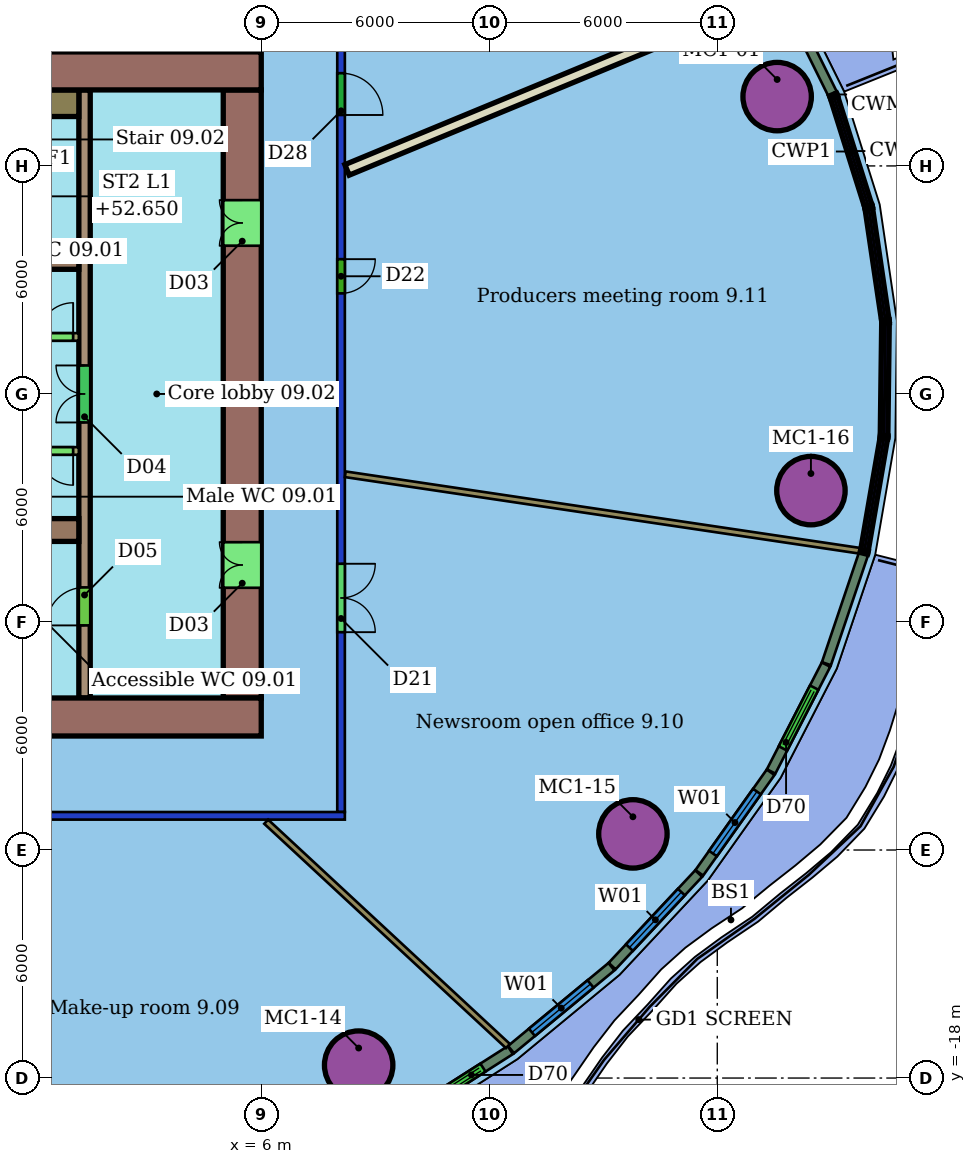
"""IFC4 building model, lengths in metres.
Left out: names, types, materials, properties, quantities, classifications, styles, units other than length and angle.
Written with IfcOpenShell. Run it as: python <this file> out.ifc"""

import sys

from ifc_helpers import new_model, si_unit, direction, frame, frame_2d, origin, origin_2d, place, context, subcontext, project, spatial, rectangle, hollow_circle, extrude, element, fill, save


model = new_model("IFC4")
c1 = context("Model", 3, precision=1e-05, world=origin(), true_north=direction((0.0, 1.0)))
c2 = subcontext(c1, "Body", "Model", "MODEL_VIEW")
j1 = project(units=[si_unit("LENGTHUNIT", "METRE"), si_unit("PLANEANGLEUNIT", "RADIAN")], contexts=[c1])
p1 = place(None, origin())
s1 = spatial("IfcSite", under=j1, at=p1, CompositionType="ELEMENT")
p2 = place(p1, origin())
s2 = spatial("IfcBuilding", under=s1, at=p2, CompositionType="ELEMENT")
p3 = place(p2, frame((0.0, 0.0, 50.8)))
s3 = spatial("IfcBuildingStorey", under=s2, at=p3, CompositionType="ELEMENT", Elevation=50.8)
for number, where, z_axis, x_axis in (
    (1, (19.575, 7.824, 0.0), (0.0, 0.0, 1.0), (1.0, 0.0, 0.0)),
    (2, (8.563, -17.66, 0.0), (0.0, 0.0, 1.0), (1.0, 0.0, 0.0)),
    (3, (15.78, -11.576, 0.0), (0.0, 0.0, 1.0), (1.0, 0.0, 0.0)),
    (4, (20.464, -2.543, 0.0), (0.0, 0.0, 1.0), (1.0, 0.0, 0.0)),
):
    element("IfcColumn", number, at=place(p3, frame(where, z_axis=z_axis, x_axis=x_axis)), inside=s3, PredefinedType="COLUMN", context=c2, shape_type="SweptSolid", body=[
        extrude(hollow_circle(Radius=0.9, WallThickness=0.06, at=origin_2d()), origin(), (0.0, 0.0, 1.0), 3.55),
    ])
p4 = place(p3, frame((8.2, -11.1, 0.0), z_axis=(0.0, 0.0, 1.0), x_axis=(-1.0, 0.0, 0.0)))
e5 = element("IfcWall", 5, at=p4, inside=s3, PredefinedType="PARTITIONING", context=c2, shape_type="SweptSolid", body=[
    extrude(rectangle(XDim=28.4, YDim=0.2, at=frame_2d((14.2, 0.0))), origin(), (0.0, 0.0, 1.0), 2.85),
])
p5 = place(p4, frame((24.814, 0.0, 0.0)))
e6 = element("IfcOpeningElement", 6, at=p5, cuts=e5, PredefinedType="OPENING", context=c2, shape_type="SweptSolid", body=[
    extrude(rectangle(XDim=1.0, YDim=2.1, at=frame_2d((0.5, 1.05))), frame((0.0, 0.11, 0.0), z_axis=(0.0, -1.0, 0.0), x_axis=(1.0, 0.0, 0.0)), (0.0, 0.0, 1.0), 0.22),
])
p6 = place(p4, frame((18.447, 0.0, 0.0)))
e7 = element("IfcOpeningElement", 7, at=p6, cuts=e5, PredefinedType="OPENING", context=c2, shape_type="SweptSolid", body=[
    extrude(rectangle(XDim=1.8, YDim=2.1, at=frame_2d((0.9, 1.05))), frame((0.0, 0.11, 0.0), z_axis=(0.0, -1.0, 0.0), x_axis=(1.0, 0.0, 0.0)), (0.0, 0.0, 1.0), 0.22),
])
p7 = place(p4, frame((7.966, 0.0, 0.0)))
e8 = element("IfcOpeningElement", 8, at=p7, cuts=e5, PredefinedType="OPENING", context=c2, shape_type="SweptSolid", body=[
    extrude(rectangle(XDim=0.9, YDim=2.1, at=frame_2d((0.45, 1.05))), frame((0.0, 0.11, 0.0), z_axis=(0.0, -1.0, 0.0), x_axis=(1.0, 0.0, 0.0)), (0.0, 0.0, 1.0), 0.22),
])
p8 = place(p3, frame((8.1, 11.0, 0.0), z_axis=(0.0, 0.0, 1.0), x_axis=(0.0, -1.0, 0.0)))
e9 = element("IfcWall", 9, at=p8, inside=s3, PredefinedType="PARTITIONING", context=c2, shape_type="SweptSolid", body=[
    extrude(rectangle(XDim=22.0, YDim=0.2, at=frame_2d((11.0, 0.0))), origin(), (0.0, 0.0, 1.0), 2.85),
])
p9 = place(p8, frame((2.56, 0.0, 0.0)))
e10 = element("IfcOpeningElement", 10, at=p9, cuts=e9, PredefinedType="OPENING", context=c2, shape_type="SweptSolid", body=[
    extrude(rectangle(XDim=1.1, YDim=2.1, at=frame_2d((0.55, 1.05))), frame((0.0, 0.11, 0.0), z_axis=(0.0, -1.0, 0.0), x_axis=(1.0, 0.0, 0.0)), (0.0, 0.0, 1.0), 0.22),
])
p10 = place(p8, frame((15.468, 0.0, 0.0)))
e11 = element("IfcOpeningElement", 11, at=p10, cuts=e9, PredefinedType="OPENING", context=c2, shape_type="SweptSolid", body=[
    extrude(rectangle(XDim=1.8, YDim=2.1, at=frame_2d((0.9, 1.05))), frame((0.0, 0.11, 0.0), z_axis=(0.0, -1.0, 0.0), x_axis=(1.0, 0.0, 0.0)), (0.0, 0.0, 1.0), 0.22),
])
p11 = place(p8, frame((7.453, 0.0, 0.0)))
e12 = element("IfcOpeningElement", 12, at=p11, cuts=e9, PredefinedType="OPENING", context=c2, shape_type="SweptSolid", body=[
    extrude(rectangle(XDim=0.9, YDim=2.1, at=frame_2d((0.45, 1.05))), frame((0.0, 0.11, 0.0), z_axis=(0.0, -1.0, 0.0), x_axis=(1.0, 0.0, 0.0)), (0.0, 0.0, 1.0), 0.22),
])
p12 = place(p3, frame((19.569, 10.573, 0.0), z_axis=(0.0, 0.0, 1.0), x_axis=(-0.924113266053, -0.382118661551, 0.0)))
e13 = element("IfcWall", 13, at=p12, inside=s3, PredefinedType="PARTITIONING", context=c2, shape_type="SweptSolid", body=[
    extrude(rectangle(XDim=12.241, YDim=0.3, at=frame_2d((6.121, 0.0))), origin(), (0.0, 0.0, 1.0), 3.55),
])
p13 = place(p3, frame((12.491, -17.157, 0.0), z_axis=(0.0, 0.0, 1.0), x_axis=(-0.733043944871, 0.680181280901, 0.0)))
e14 = element("IfcWall", 14, at=p13, inside=s3, PredefinedType="PARTITIONING", context=c2, shape_type="SweptSolid", body=[
    extrude(rectangle(XDim=8.678, YDim=0.15, at=frame_2d((4.339, 0.0))), origin(), (0.0, 0.0, 1.0), 3.55),
])
p14 = place(p3, frame((21.744, -4.125, 0.0), z_axis=(0.0, 0.0, 1.0), x_axis=(-0.989126490961, 0.147067280113, 0.0)))
e15 = element("IfcWall", 15, at=p14, inside=s3, PredefinedType="PARTITIONING", context=c2, shape_type="SweptSolid", body=[
    extrude(rectangle(XDim=13.682, YDim=0.15, at=frame_2d((6.841, 0.0))), origin(), (0.0, 0.0, 1.0), 3.55),
])
p15 = place(p3, frame((21.036, 7.892, 0.0), z_axis=(0.0, 0.0, 1.0), x_axis=(-0.443751201737, 0.896150027036, 0.0)))
e16 = element("IfcWall", 16, at=p15, inside=s3, PredefinedType="SOLIDWALL", context=c2, shape_type="SweptSolid", body=[
    extrude(rectangle(XDim=3.049, YDim=0.25, at=frame_2d((1.524, 0.0))), origin(), (0.0, 0.0, 1.0), 3.15),
])
p16 = place(p3, frame((9.595, -19.154, 0.0), z_axis=(0.0, 0.0, 1.0), x_axis=(0.843008079685, 0.53790089941, 0.0)))
e17 = element("IfcWall", 17, at=p16, inside=s3, PredefinedType="SOLIDWALL", context=c2, shape_type="SweptSolid", body=[
    extrude(rectangle(XDim=3.511, YDim=0.25, at=frame_2d((1.756, 0.0))), origin(), (0.0, 0.0, 1.0), 3.15),
])
p17 = place(p16, frame((0.856, 0.0, 0.0)))
e18 = element("IfcOpeningElement", 18, at=p17, cuts=e17, PredefinedType="OPENING", context=c2, shape_type="SweptSolid", body=[
    extrude(rectangle(XDim=1.8, YDim=2.4, at=frame_2d((0.9, 1.2))), frame((0.0, 0.135, 0.0), z_axis=(0.0, -1.0, 0.0), x_axis=(1.0, 0.0, 0.0)), (0.0, 0.0, 1.0), 0.27),
])
p18 = place(p3, frame((12.573, -17.251, 0.0), z_axis=(0.0, 0.0, 1.0), x_axis=(0.771145821292, 0.636658560222, 0.0)))
e19 = element("IfcWall", 19, at=p18, inside=s3, PredefinedType="SOLIDWALL", context=c2, shape_type="SweptSolid", body=[
    extrude(rectangle(XDim=3.426, YDim=0.25, at=frame_2d((1.713, 0.0))), origin(), (0.0, 0.0, 1.0), 3.15),
])
p19 = place(p18, frame((0.713, 0.0, 0.8)))
e20 = element("IfcOpeningElement", 20, at=p19, cuts=e19, PredefinedType="OPENING", context=c2, shape_type="SweptSolid", body=[
    extrude(rectangle(XDim=2.0, YDim=2.2, at=frame_2d((1.0, 1.1))), frame((0.0, 0.135, 0.0), z_axis=(0.0, -1.0, 0.0), x_axis=(1.0, 0.0, 0.0)), (0.0, 0.0, 1.0), 0.27),
])
p20 = place(p3, frame((15.233, -15.054, 0.0), z_axis=(0.0, 0.0, 1.0), x_axis=(0.683288117208, 0.730148853921, 0.0)))
e21 = element("IfcWall", 21, at=p20, inside=s3, PredefinedType="SOLIDWALL", context=c2, shape_type="SweptSolid", body=[
    extrude(rectangle(XDim=3.334, YDim=0.25, at=frame_2d((1.667, 0.0))), origin(), (0.0, 0.0, 1.0), 3.15),
])
p21 = place(p20, frame((0.667, 0.0, 0.8)))
e22 = element("IfcOpeningElement", 22, at=p21, cuts=e21, PredefinedType="OPENING", context=c2, shape_type="SweptSolid", body=[
    extrude(rectangle(XDim=2.0, YDim=2.2, at=frame_2d((1.0, 1.1))), frame((0.0, 0.135, 0.0), z_axis=(0.0, -1.0, 0.0), x_axis=(1.0, 0.0, 0.0)), (0.0, 0.0, 1.0), 0.27),
])
p22 = place(p3, frame((17.527, -12.6, 0.0), z_axis=(0.0, 0.0, 1.0), x_axis=(0.578643660536, 0.81558047679, 0.0)))
e23 = element("IfcWall", 23, at=p22, inside=s3, PredefinedType="SOLIDWALL", context=c2, shape_type="SweptSolid", body=[
    extrude(rectangle(XDim=3.244, YDim=0.25, at=frame_2d((1.622, 0.0))), origin(), (0.0, 0.0, 1.0), 3.15),
])
p23 = place(p22, frame((0.622, 0.0, 0.8)))
e24 = element("IfcOpeningElement", 24, at=p23, cuts=e23, PredefinedType="OPENING", context=c2, shape_type="SweptSolid", body=[
    extrude(rectangle(XDim=2.0, YDim=2.2, at=frame_2d((1.0, 1.1))), frame((0.0, 0.135, 0.0), z_axis=(0.0, -1.0, 0.0), x_axis=(1.0, 0.0, 0.0)), (0.0, 0.0, 1.0), 0.27),
])
p24 = place(p3, frame((19.417, -9.932, 0.0), z_axis=(0.0, 0.0, 1.0), x_axis=(0.457105364661, 0.889412550844, 0.0)))
e25 = element("IfcWall", 25, at=p24, inside=s3, PredefinedType="SOLIDWALL", context=c2, shape_type="SweptSolid", body=[
    extrude(rectangle(XDim=3.16, YDim=0.25, at=frame_2d((1.58, 0.0))), origin(), (0.0, 0.0, 1.0), 3.15),
])
p25 = place(p24, frame((0.68, 0.0, 0.0)))
e26 = element("IfcOpeningElement", 26, at=p25, cuts=e25, PredefinedType="OPENING", context=c2, shape_type="SweptSolid", body=[
    extrude(rectangle(XDim=1.8, YDim=2.4, at=frame_2d((0.9, 1.2))), frame((0.0, 0.135, 0.0), z_axis=(0.0, -1.0, 0.0), x_axis=(1.0, 0.0, 0.0)), (0.0, 0.0, 1.0), 0.27),
])
p26 = place(p3, frame((20.872, -7.097, 0.0), z_axis=(0.0, 0.0, 1.0), x_axis=(0.319948454673, 0.947434950987, 0.0)))
e27 = element("IfcWall", 27, at=p26, inside=s3, PredefinedType="SOLIDWALL", context=c2, shape_type="SweptSolid", body=[
    extrude(rectangle(XDim=3.049, YDim=0.25, at=frame_2d((1.525, 0.0))), origin(), (0.0, 0.0, 1.0), 3.15),
])
p27 = place(p3, frame((6.0, 8.5, 0.0), z_axis=(0.0, 0.0, 1.0), x_axis=(-1.0, 0.0, 0.0)))
e28 = element("IfcWall", 28, at=p27, inside=s3, PredefinedType="SHEAR", context=c2, shape_type="SweptSolid", body=[
    extrude(rectangle(XDim=12.0, YDim=1.0, at=frame_2d((6.0, 0.0))), origin(), (0.0, 0.0, 1.0), 3.4),
])
p28 = place(p27, frame((5.6, 0.0, 0.0)))
e29 = element("IfcOpeningElement", 29, at=p28, cuts=e28, PredefinedType="OPENING", context=c2, shape_type="SweptSolid", body=[
    extrude(rectangle(XDim=1.2, YDim=2.1, at=frame_2d((0.6, 1.05))), frame((0.0, 0.51, 0.0), z_axis=(0.0, -1.0, 0.0), x_axis=(1.0, 0.0, 0.0)), (0.0, 0.0, 1.0), 1.02),
])
p29 = place(p3, frame((-18.0, -8.5, 0.0), z_axis=(0.0, 0.0, 1.0), x_axis=(1.0, 0.0, 0.0)))
e30 = element("IfcWall", 30, at=p29, inside=s3, PredefinedType="SHEAR", context=c2, shape_type="SweptSolid", body=[
    extrude(rectangle(XDim=24.0, YDim=1.0, at=frame_2d((12.0, 0.0))), origin(), (0.0, 0.0, 1.0), 3.4),
])
p30 = place(p29, frame((6.0, 0.0, 0.0)))
e31 = element("IfcOpeningElement", 31, at=p30, cuts=e30, PredefinedType="OPENING", context=c2, shape_type="SweptSolid", body=[
    extrude(rectangle(XDim=1.2, YDim=2.1, at=frame_2d((0.6, 1.05))), frame((0.0, 0.51, 0.0), z_axis=(0.0, -1.0, 0.0), x_axis=(1.0, 0.0, 0.0)), (0.0, 0.0, 1.0), 1.02),
])
p31 = place(p3, frame((5.5, -8.0, 0.0), z_axis=(0.0, 0.0, 1.0), x_axis=(0.0, 1.0, 0.0)))
e32 = element("IfcWall", 32, at=p31, inside=s3, PredefinedType="SHEAR", context=c2, shape_type="SweptSolid", body=[
    extrude(rectangle(XDim=16.0, YDim=1.0, at=frame_2d((8.0, 0.0))), origin(), (0.0, 0.0, 1.0), 3.4),
])
p32 = place(p31, frame((2.9, 0.0, 0.0)))
e33 = element("IfcOpeningElement", 33, at=p32, cuts=e32, PredefinedType="OPENING", context=c2, shape_type="SweptSolid", body=[
    extrude(rectangle(XDim=1.2, YDim=2.1, at=frame_2d((0.6, 1.05))), frame((0.0, 0.51, 0.0), z_axis=(0.0, -1.0, 0.0), x_axis=(1.0, 0.0, 0.0)), (0.0, 0.0, 1.0), 1.02),
])
p33 = place(p31, frame((11.9, 0.0, 0.0)))
e34 = element("IfcOpeningElement", 34, at=p33, cuts=e32, PredefinedType="OPENING", context=c2, shape_type="SweptSolid", body=[
    extrude(rectangle(XDim=1.2, YDim=2.1, at=frame_2d((0.6, 1.05))), frame((0.0, 0.51, 0.0), z_axis=(0.0, -1.0, 0.0), x_axis=(1.0, 0.0, 0.0)), (0.0, 0.0, 1.0), 1.02),
])
for number, where, z_axis, x_axis in (
    (35, (-6.0, 3.58, 0.0), (0.0, 0.0, 1.0), (1.0, 0.0, 0.0)),
    (36, (-6.0, -3.58, 0.0), (0.0, 0.0, 1.0), (1.0, 0.0, 0.0)),
):
    element("IfcWall", number, at=place(p3, frame(where, z_axis=z_axis, x_axis=x_axis)), inside=s3, PredefinedType="SHEAR", context=c2, shape_type="SweptSolid", body=[
        extrude(rectangle(XDim=7.2, YDim=0.6, at=frame_2d((3.6, 0.0))), origin(), (0.0, 0.0, 1.0), 3.4),
    ])
p34 = place(p3, frame((1.35, -8.0, 0.0), z_axis=(0.0, 0.0, 1.0), x_axis=(0.0, 1.0, 0.0)))
e37 = element("IfcWall", 37, at=p34, inside=s3, PredefinedType="SHEAR", context=c2, shape_type="SweptSolid", body=[
    extrude(rectangle(XDim=16.0, YDim=0.3, at=frame_2d((8.0, 0.0))), origin(), (0.0, 0.0, 1.0), 3.4),
])
p35 = place(p34, frame((1.91, 0.0, 0.0)))
e38 = element("IfcOpeningElement", 38, at=p35, cuts=e37, PredefinedType="OPENING", context=c2, shape_type="SweptSolid", body=[
    extrude(rectangle(XDim=1.0, YDim=2.1, at=frame_2d((0.5, 1.05))), frame((0.0, 0.16, 0.0), z_axis=(0.0, -1.0, 0.0), x_axis=(1.0, 0.0, 0.0)), (0.0, 0.0, 1.0), 0.32),
])
p36 = place(p34, frame((7.25, 0.0, 0.0)))
e39 = element("IfcOpeningElement", 39, at=p36, cuts=e37, PredefinedType="OPENING", context=c2, shape_type="SweptSolid", body=[
    extrude(rectangle(XDim=1.5, YDim=2.1, at=frame_2d((0.75, 1.05))), frame((0.0, 0.16, 0.0), z_axis=(0.0, -1.0, 0.0), x_axis=(1.0, 0.0, 0.0)), (0.0, 0.0, 1.0), 0.32),
])
p37 = place(p3, frame((-13.2, 1.5, 0.0), z_axis=(0.0, 0.0, 1.0), x_axis=(1.0, 0.0, 0.0)))
e40 = element("IfcWall", 40, at=p37, inside=s3, PredefinedType="SHEAR", context=c2, shape_type="SweptSolid", body=[
    extrude(rectangle(XDim=14.4, YDim=0.2, at=frame_2d((7.2, 0.0))), origin(), (0.0, 0.0, 1.0), 3.4),
])
p38 = place(p37, frame((0.546, 0.0, 0.0)))
e41 = element("IfcOpeningElement", 41, at=p38, cuts=e40, PredefinedType="OPENING", context=c2, shape_type="SweptSolid", body=[
    extrude(rectangle(XDim=1.1, YDim=2.1, at=frame_2d((0.55, 1.05))), frame((0.0, 0.11, 0.0), z_axis=(0.0, -1.0, 0.0), x_axis=(1.0, 0.0, 0.0)), (0.0, 0.0, 1.0), 0.22),
])
p39 = place(p37, frame((2.988, 0.0, 0.0)))
e42 = element("IfcOpeningElement", 42, at=p39, cuts=e40, PredefinedType="OPENING", context=c2, shape_type="SweptSolid", body=[
    extrude(rectangle(XDim=1.1, YDim=2.1, at=frame_2d((0.55, 1.05))), frame((0.0, 0.11, 0.0), z_axis=(0.0, -1.0, 0.0), x_axis=(1.0, 0.0, 0.0)), (0.0, 0.0, 1.0), 0.22),
])
p40 = place(p37, frame((5.429, 0.0, 0.0)))
e43 = element("IfcOpeningElement", 43, at=p40, cuts=e40, PredefinedType="OPENING", context=c2, shape_type="SweptSolid", body=[
    extrude(rectangle(XDim=1.1, YDim=2.1, at=frame_2d((0.55, 1.05))), frame((0.0, 0.11, 0.0), z_axis=(0.0, -1.0, 0.0), x_axis=(1.0, 0.0, 0.0)), (0.0, 0.0, 1.0), 0.22),
])
p41 = place(p37, frame((7.871, 0.0, 0.0)))
e44 = element("IfcOpeningElement", 44, at=p41, cuts=e40, PredefinedType="OPENING", context=c2, shape_type="SweptSolid", body=[
    extrude(rectangle(XDim=1.1, YDim=2.1, at=frame_2d((0.55, 1.05))), frame((0.0, 0.11, 0.0), z_axis=(0.0, -1.0, 0.0), x_axis=(1.0, 0.0, 0.0)), (0.0, 0.0, 1.0), 0.22),
])
p42 = place(p37, frame((13.35, 0.0, 0.0)))
e45 = element("IfcOpeningElement", 45, at=p42, cuts=e40, PredefinedType="OPENING", context=c2, shape_type="SweptSolid", body=[
    extrude(rectangle(XDim=0.9, YDim=2.1, at=frame_2d((0.45, 1.05))), frame((0.0, 0.11, 0.0), z_axis=(0.0, -1.0, 0.0), x_axis=(1.0, 0.0, 0.0)), (0.0, 0.0, 1.0), 0.22),
])
p43 = place(p3, frame((1.2, -1.5, 0.0), z_axis=(0.0, 0.0, 1.0), x_axis=(-1.0, 0.0, 0.0)))
e46 = element("IfcWall", 46, at=p43, inside=s3, PredefinedType="SHEAR", context=c2, shape_type="SweptSolid", body=[
    extrude(rectangle(XDim=14.4, YDim=0.2, at=frame_2d((7.2, 0.0))), origin(), (0.0, 0.0, 1.0), 3.4),
])
p44 = place(p43, frame((7.821, 0.0, 0.0)))
e47 = element("IfcOpeningElement", 47, at=p44, cuts=e46, PredefinedType="OPENING", context=c2, shape_type="SweptSolid", body=[
    extrude(rectangle(XDim=1.2, YDim=2.1, at=frame_2d((0.6, 1.05))), frame((0.0, 0.11, 0.0), z_axis=(0.0, -1.0, 0.0), x_axis=(1.0, 0.0, 0.0)), (0.0, 0.0, 1.0), 0.22),
])
p45 = place(p43, frame((0.15, 0.0, 0.0)))
e48 = element("IfcOpeningElement", 48, at=p45, cuts=e46, PredefinedType="OPENING", context=c2, shape_type="SweptSolid", body=[
    extrude(rectangle(XDim=0.9, YDim=2.1, at=frame_2d((0.45, 1.05))), frame((0.0, 0.11, 0.0), z_axis=(0.0, -1.0, 0.0), x_axis=(1.0, 0.0, 0.0)), (0.0, 0.0, 1.0), 0.22),
])
p46 = place(p3, frame((0.4, 7.65, 0.0), z_axis=(0.0, 0.0, 1.0), x_axis=(1.0, 0.0, 0.0)))
e49 = element("IfcWall", 49, at=p46, inside=s3, PredefinedType="SHEAR", context=c2, shape_type="SweptSolid", body=[
    extrude(rectangle(XDim=0.8, YDim=0.7, at=frame_2d((0.4, 0.0))), origin(), (0.0, 0.0, 1.0), 3.4),
])
p47 = place(p9, origin())
e50 = element("IfcDoor", 50, at=p47, inside=s3, OperationType="SINGLE_SWING_RIGHT", PredefinedType="DOOR", context=c2, shape_type="SweptSolid", body=[
    extrude(rectangle(XDim=1.1, YDim=2.1, at=frame_2d((0.55, 1.05))), frame((0.0, 0.025, 0.0), z_axis=(0.0, -1.0, 0.0), x_axis=(1.0, 0.0, 0.0)), (0.0, 0.0, 1.0), 0.05),
])
fill(e10, e50)
p48 = place(p10, origin())
e51 = element("IfcDoor", 51, at=p48, inside=s3, OperationType="DOUBLE_DOOR_SINGLE_SWING", PredefinedType="DOOR", context=c2, shape_type="SweptSolid", body=[
    extrude(rectangle(XDim=1.8, YDim=2.1, at=frame_2d((0.9, 1.05))), frame((0.0, 0.025, 0.0), z_axis=(0.0, -1.0, 0.0), x_axis=(1.0, 0.0, 0.0)), (0.0, 0.0, 1.0), 0.05),
])
fill(e11, e51)
p49 = place(p11, origin())
e52 = element("IfcDoor", 52, at=p49, inside=s3, OperationType="SINGLE_SWING_LEFT", PredefinedType="DOOR", context=c2, shape_type="SweptSolid", body=[
    extrude(rectangle(XDim=0.9, YDim=2.1, at=frame_2d((0.45, 1.05))), frame((0.0, 0.025, 0.0), z_axis=(0.0, -1.0, 0.0), x_axis=(1.0, 0.0, 0.0)), (0.0, 0.0, 1.0), 0.05),
])
fill(e12, e52)
p50 = place(p17, origin())
e53 = element("IfcDoor", 53, at=p50, inside=s3, OperationType="DOUBLE_DOOR_SLIDING", PredefinedType="DOOR", context=c2, shape_type="SweptSolid", body=[
    extrude(rectangle(XDim=1.8, YDim=2.4, at=frame_2d((0.9, 1.2))), frame((0.0, 0.025, 0.0), z_axis=(0.0, -1.0, 0.0), x_axis=(1.0, 0.0, 0.0)), (0.0, 0.0, 1.0), 0.05),
])
fill(e18, e53)
p51 = place(p19, origin())
e54 = element("IfcWindow", 54, at=p51, inside=s3, PartitioningType="SINGLE_PANEL", PredefinedType="WINDOW", context=c2, shape_type="SweptSolid", body=[
    extrude(rectangle(XDim=2.0, YDim=2.2, at=frame_2d((1.0, 1.1))), frame((0.0, 0.03, 0.0), z_axis=(0.0, -1.0, 0.0), x_axis=(1.0, 0.0, 0.0)), (0.0, 0.0, 1.0), 0.06),
])
fill(e20, e54)
p52 = place(p21, origin())
e55 = element("IfcWindow", 55, at=p52, inside=s3, PartitioningType="SINGLE_PANEL", PredefinedType="WINDOW", context=c2, shape_type="SweptSolid", body=[
    extrude(rectangle(XDim=2.0, YDim=2.2, at=frame_2d((1.0, 1.1))), frame((0.0, 0.03, 0.0), z_axis=(0.0, -1.0, 0.0), x_axis=(1.0, 0.0, 0.0)), (0.0, 0.0, 1.0), 0.06),
])
fill(e22, e55)
p53 = place(p23, origin())
e56 = element("IfcWindow", 56, at=p53, inside=s3, PartitioningType="SINGLE_PANEL", PredefinedType="WINDOW", context=c2, shape_type="SweptSolid", body=[
    extrude(rectangle(XDim=2.0, YDim=2.2, at=frame_2d((1.0, 1.1))), frame((0.0, 0.03, 0.0), z_axis=(0.0, -1.0, 0.0), x_axis=(1.0, 0.0, 0.0)), (0.0, 0.0, 1.0), 0.06),
])
fill(e24, e56)
p54 = place(p25, origin())
e57 = element("IfcDoor", 57, at=p54, inside=s3, OperationType="DOUBLE_DOOR_SLIDING", PredefinedType="DOOR", context=c2, shape_type="SweptSolid", body=[
    extrude(rectangle(XDim=1.8, YDim=2.4, at=frame_2d((0.9, 1.2))), frame((0.0, 0.025, 0.0), z_axis=(0.0, -1.0, 0.0), x_axis=(1.0, 0.0, 0.0)), (0.0, 0.0, 1.0), 0.05),
])
fill(e26, e57)
p55 = place(p32, origin())
e58 = element("IfcDoor", 58, at=p55, inside=s3, OperationType="DOUBLE_DOOR_SINGLE_SWING", PredefinedType="NOTDEFINED", context=c2, shape_type="SweptSolid", body=[
    extrude(rectangle(XDim=1.2, YDim=2.1, at=frame_2d((0.6, 1.05))), frame((0.0, 0.025, 0.0), z_axis=(0.0, -1.0, 0.0), x_axis=(1.0, 0.0, 0.0)), (0.0, 0.0, 1.0), 0.05),
])
fill(e33, e58)
p56 = place(p33, origin())
e59 = element("IfcDoor", 59, at=p56, inside=s3, OperationType="DOUBLE_DOOR_SINGLE_SWING", PredefinedType="NOTDEFINED", context=c2, shape_type="SweptSolid", body=[
    extrude(rectangle(XDim=1.2, YDim=2.1, at=frame_2d((0.6, 1.05))), frame((0.0, 0.025, 0.0), z_axis=(0.0, -1.0, 0.0), x_axis=(1.0, 0.0, 0.0)), (0.0, 0.0, 1.0), 0.05),
])
fill(e34, e59)
p57 = place(p35, origin())
e60 = element("IfcDoor", 60, at=p57, inside=s3, OperationType="SINGLE_SWING_LEFT", PredefinedType="NOTDEFINED", context=c2, shape_type="SweptSolid", body=[
    extrude(rectangle(XDim=1.0, YDim=2.1, at=frame_2d((0.5, 1.05))), frame((0.0, 0.025, 0.0), z_axis=(0.0, -1.0, 0.0), x_axis=(1.0, 0.0, 0.0)), (0.0, 0.0, 1.0), 0.05),
])
fill(e38, e60)
p58 = place(p36, origin())
e61 = element("IfcDoor", 61, at=p58, inside=s3, OperationType="DOUBLE_DOOR_SINGLE_SWING", PredefinedType="NOTDEFINED", context=c2, shape_type="SweptSolid", body=[
    extrude(rectangle(XDim=1.5, YDim=2.1, at=frame_2d((0.75, 1.05))), frame((0.0, 0.025, 0.0), z_axis=(0.0, -1.0, 0.0), x_axis=(1.0, 0.0, 0.0)), (0.0, 0.0, 1.0), 0.05),
])
fill(e39, e61)
p59 = place(p42, origin())
e62 = element("IfcDoor", 62, at=p59, inside=s3, OperationType="SINGLE_SWING_RIGHT", PredefinedType="NOTDEFINED", context=c2, shape_type="SweptSolid", body=[
    extrude(rectangle(XDim=0.9, YDim=2.1, at=frame_2d((0.45, 1.05))), frame((0.0, 0.025, 0.0), z_axis=(0.0, -1.0, 0.0), x_axis=(1.0, 0.0, 0.0)), (0.0, 0.0, 1.0), 0.05),
])
fill(e45, e62)
p60 = place(p45, origin())
e63 = element("IfcDoor", 63, at=p60, inside=s3, OperationType="SINGLE_SWING_LEFT", PredefinedType="NOTDEFINED", context=c2, shape_type="SweptSolid", body=[
    extrude(rectangle(XDim=0.9, YDim=2.1, at=frame_2d((0.45, 1.05))), frame((0.0, 0.025, 0.0), z_axis=(0.0, -1.0, 0.0), x_axis=(1.0, 0.0, 0.0)), (0.0, 0.0, 1.0), 0.05),
])
fill(e48, e63)
save(model, sys.argv[1])
